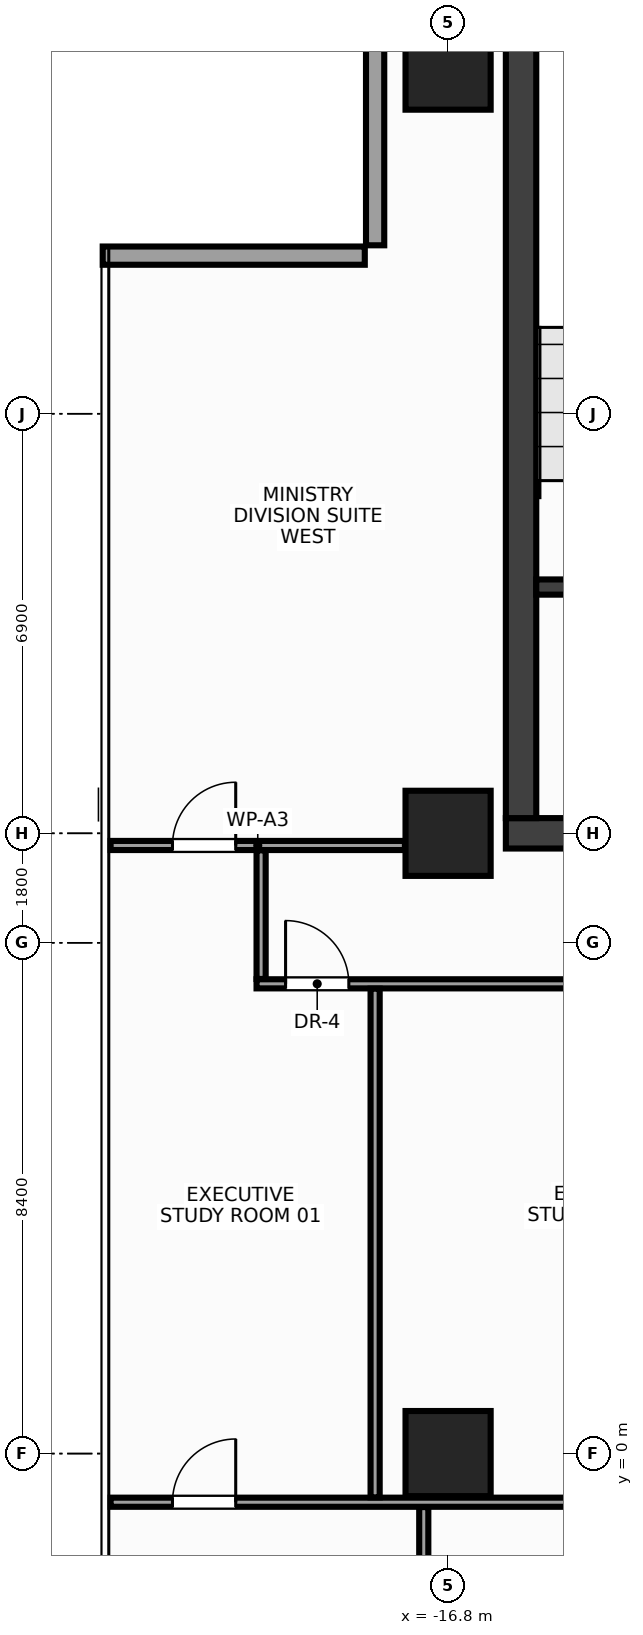
"""IFC4 building model, lengths in metres.
Left out: names, types, materials, properties, quantities, classifications, styles, units other than length and angle.
Written with IfcOpenShell. Run it as: python <this file> out.ifc"""

import sys

from ifc_helpers import new_model, si_unit, direction, frame, frame_2d, origin, origin_2d, place, context, subcontext, project, spatial, rectangle, extrude, source, transform, mapped, element, fill, save


model = new_model("IFC4")
c1 = context("Model", 3, precision=1e-05, world=origin(), true_north=direction((0.0, 1.0)))
c2 = subcontext(c1, "Body", "Model", "MODEL_VIEW")
j1 = project(units=[si_unit("LENGTHUNIT", "METRE"), si_unit("PLANEANGLEUNIT", "RADIAN")], contexts=[c1])
p1 = place(None, origin())
s1 = spatial("IfcSite", under=j1, at=p1, CompositionType="ELEMENT")
p2 = place(p1, origin())
s2 = spatial("IfcBuilding", under=s1, at=p2, CompositionType="ELEMENT")
p3 = place(p2, frame((0.0, 0.0, 243.2)))
s3 = spatial("IfcBuildingStorey", under=s2, at=p3, CompositionType="ELEMENT", Elevation=243.2)
m1 = source(origin(), c2, "Body", "SweptSolid", [
    extrude(rectangle(XDim=31.7, YDim=0.5, at=frame_2d((15.85, 0.0))), origin(), (0.0, 0.0, 1.0), 3.6),
])
p4 = place(p3, frame((-15.85, 10.2, 0.0), z_axis=(0.0, 0.0, 1.0), x_axis=(1.0, 0.0, 0.0)))
e1 = element("IfcWall", 1, at=p4, inside=s3, PredefinedType="SHEAR", context=c2, shape_type="MappedRepresentation", body=[
    mapped(m1, transform((0.0, 0.0, 0.0), x_axis=(1.0, 0.0, 0.0), y_axis=(0.0, 1.0, 0.0), z_axis=(0.0, 0.0, 1.0), scale=1.0)),
])
p5 = place(p4, frame((1.7, 0.0, 0.0)))
e2 = element("IfcOpeningElement", 2, at=p5, cuts=e1, PredefinedType="OPENING", context=c2, shape_type="SweptSolid", body=[
    extrude(rectangle(XDim=1.6, YDim=2.15, at=frame_2d((0.8, 1.075))), frame((0.0, 0.262, 0.0), z_axis=(0.0, -1.0, 0.0), x_axis=(1.0, 0.0, 0.0)), (0.0, 0.0, 1.0), 0.524),
])
p6 = place(p4, frame((28.4, 0.0, 0.0)))
e3 = element("IfcOpeningElement", 3, at=p6, cuts=e1, PredefinedType="OPENING", context=c2, shape_type="SweptSolid", body=[
    extrude(rectangle(XDim=1.6, YDim=2.15, at=frame_2d((0.8, 1.075))), frame((0.0, 0.262, 0.0), z_axis=(0.0, -1.0, 0.0), x_axis=(1.0, 0.0, 0.0)), (0.0, 0.0, 1.0), 0.524),
])
p7 = place(p4, frame((15.1, 0.0, 0.0)))
e4 = element("IfcOpeningElement", 4, at=p7, cuts=e1, PredefinedType="OPENING", context=c2, shape_type="SweptSolid", body=[
    extrude(rectangle(XDim=1.5, YDim=2.2, at=frame_2d((0.75, 1.1))), frame((0.0, 0.262, 0.0), z_axis=(0.0, -1.0, 0.0), x_axis=(1.0, 0.0, 0.0)), (0.0, 0.0, 1.0), 0.524),
])
m2 = source(origin(), c2, "Body", "SweptSolid", [
    extrude(rectangle(XDim=13.1, YDim=0.5, at=frame_2d((6.55, 0.0))), origin(), (0.0, 0.0, 1.0), 3.6),
])
p8 = place(p3, frame((-15.6, 10.45, 0.0), z_axis=(0.0, 0.0, 1.0), x_axis=(0.0, 1.0, 0.0)))
e5 = element("IfcWall", 5, at=p8, inside=s3, PredefinedType="SHEAR", context=c2, shape_type="MappedRepresentation", body=[
    mapped(m2, transform((0.0, 0.0, 0.0), x_axis=(1.0, 0.0, 0.0), y_axis=(0.0, 1.0, 0.0), z_axis=(0.0, 0.0, 1.0), scale=1.0)),
])
m3 = source(origin(), c2, "Body", "SweptSolid", [
    extrude(rectangle(XDim=3.705, YDim=0.25, at=frame_2d((1.853, 0.0))), origin(), (0.0, 0.0, 1.0), 3.6),
])
p9 = place(p3, frame((-15.35, 14.25, 0.0), z_axis=(0.0, 0.0, 1.0), x_axis=(1.0, 0.0, 0.0)))
e6 = element("IfcWall", 6, at=p9, inside=s3, PredefinedType="SHEAR", context=c2, shape_type="MappedRepresentation", body=[
    mapped(m3, transform((0.0, 0.0, 0.0), x_axis=(1.0, 0.0, 0.0), y_axis=(0.0, 1.0, 0.0), z_axis=(0.0, 0.0, 1.0), scale=1.0)),
])
p10 = place(p9, frame((0.95, 0.0, 0.0)))
e7 = element("IfcOpeningElement", 7, at=p10, cuts=e6, PredefinedType="OPENING", context=c2, shape_type="SweptSolid", body=[
    extrude(rectangle(XDim=1.6, YDim=2.15, at=frame_2d((0.8, 1.075))), frame((0.0, 0.137, 0.0), z_axis=(0.0, -1.0, 0.0), x_axis=(1.0, 0.0, 0.0)), (0.0, 0.0, 1.0), 0.274),
])
m4 = source(origin(), c2, "Body", "SweptSolid", [
    extrude(rectangle(XDim=1.4, YDim=1.4, at=origin_2d()), origin(), (0.0, 0.0, 1.0), 3.6),
])
for number, where, z_axis, x_axis in (
    (8, (-16.8, 0.0, 0.0), (0.0, 0.0, 1.0), (1.0, 0.0, 0.0)),
    (9, (-16.8, 10.2, 0.0), (0.0, 0.0, 1.0), (1.0, 0.0, 0.0)),
    (10, (-16.8, 22.8, 0.0), (0.0, 0.0, 1.0), (1.0, 0.0, 0.0)),
):
    element("IfcColumn", number, at=place(p3, frame(where, z_axis=z_axis, x_axis=x_axis)), inside=s3, PredefinedType="COLUMN", context=c2, shape_type="MappedRepresentation", body=[
        mapped(m4, transform((0.0, 0.0, 0.0), x_axis=(1.0, 0.0, 0.0), y_axis=(0.0, 1.0, 0.0), z_axis=(0.0, 0.0, 1.0), scale=1.0)),
    ])
m5 = source(origin(), c2, "Body", "SweptSolid", [
    extrude(rectangle(XDim=4.31, YDim=0.3, at=frame_2d((2.155, 0.0))), origin(), (0.0, 0.0, 1.0), 2.75),
])
p11 = place(p3, frame((-18.0, 24.18, 0.0), z_axis=(0.0, 0.0, 1.0), x_axis=(0.0, -1.0, 0.0)))
e11 = element("IfcWall", 11, at=p11, inside=s3, PredefinedType="STANDARD", context=c2, shape_type="MappedRepresentation", body=[
    mapped(m5, transform((0.0, 0.0, 0.0), x_axis=(1.0, 0.0, 0.0), y_axis=(0.0, 1.0, 0.0), z_axis=(0.0, 0.0, 1.0), scale=1.0)),
])
m6 = source(origin(), c2, "Body", "SweptSolid", [
    extrude(rectangle(XDim=4.31, YDim=0.3, at=frame_2d((2.155, 0.0))), origin(), (0.0, 0.0, 1.0), 2.75),
])
p12 = place(p3, frame((-18.17, 19.7, 0.0), z_axis=(0.0, 0.0, 1.0), x_axis=(-1.0, 0.0, 0.0)))
e12 = element("IfcWall", 12, at=p12, inside=s3, PredefinedType="STANDARD", context=c2, shape_type="MappedRepresentation", body=[
    mapped(m6, transform((0.0, 0.0, 0.0), x_axis=(1.0, 0.0, 0.0), y_axis=(0.0, 1.0, 0.0), z_axis=(0.0, 0.0, 1.0), scale=1.0)),
])
m7 = source(origin(), c2, "Body", "SweptSolid", [
    extrude(rectangle(XDim=4.84, YDim=0.15, at=frame_2d((2.42, 0.0))), origin(), (0.0, 0.0, 1.0), 3.37),
])
p13 = place(p3, frame((-22.35, 10.0, 0.0), z_axis=(0.0, 0.0, 1.0), x_axis=(1.0, 0.0, 0.0)))
e13 = element("IfcWall", 13, at=p13, inside=s3, PredefinedType="PARTITIONING", context=c2, shape_type="MappedRepresentation", body=[
    mapped(m7, transform((0.0, 0.0, 0.0), x_axis=(1.0, 0.0, 0.0), y_axis=(0.0, 1.0, 0.0), z_axis=(0.0, 0.0, 1.0), scale=1.0)),
])
p14 = place(p13, frame((1.018, 0.0, 0.0)))
e14 = element("IfcOpeningElement", 14, at=p14, cuts=e13, PredefinedType="OPENING", context=c2, shape_type="SweptSolid", body=[
    extrude(rectangle(XDim=1.04, YDim=2.2, at=frame_2d((0.52, 1.1))), frame((0.0, 0.087, 0.0), z_axis=(0.0, -1.0, 0.0), x_axis=(1.0, 0.0, 0.0)), (0.0, 0.0, 1.0), 0.174),
])
m8 = source(origin(), c2, "Body", "SweptSolid", [
    extrude(rectangle(XDim=15.6, YDim=0.15, at=frame_2d((7.8, 0.0))), origin(), (0.0, 0.0, 1.0), 2.755),
])
p15 = place(p3, frame((-19.95, 7.725, 0.0), z_axis=(0.0, 0.0, 1.0), x_axis=(1.0, 0.0, 0.0)))
e15 = element("IfcWall", 15, at=p15, inside=s3, PredefinedType="PARTITIONING", context=c2, shape_type="MappedRepresentation", body=[
    mapped(m8, transform((0.0, 0.0, 0.0), x_axis=(1.0, 0.0, 0.0), y_axis=(0.0, 1.0, 0.0), z_axis=(0.0, 0.0, 1.0), scale=1.0)),
])
p16 = place(p15, frame((0.478, 0.0, 0.0)))
e16 = element("IfcOpeningElement", 16, at=p16, cuts=e15, PredefinedType="OPENING", context=c2, shape_type="SweptSolid", body=[
    extrude(rectangle(XDim=1.04, YDim=2.2, at=frame_2d((0.52, 1.1))), frame((0.0, 0.087, 0.0), z_axis=(0.0, -1.0, 0.0), x_axis=(1.0, 0.0, 0.0)), (0.0, 0.0, 1.0), 0.174),
])
p17 = place(p15, frame((5.63, 0.0, 0.0)))
e17 = element("IfcOpeningElement", 17, at=p17, cuts=e15, PredefinedType="OPENING", context=c2, shape_type="SweptSolid", body=[
    extrude(rectangle(XDim=1.04, YDim=2.2, at=frame_2d((0.52, 1.1))), frame((0.0, 0.087, 0.0), z_axis=(0.0, -1.0, 0.0), x_axis=(1.0, 0.0, 0.0)), (0.0, 0.0, 1.0), 0.174),
])
p18 = place(p15, frame((12.433, 0.0, 0.0)))
e18 = element("IfcOpeningElement", 18, at=p18, cuts=e15, PredefinedType="OPENING", context=c2, shape_type="SweptSolid", body=[
    extrude(rectangle(XDim=1.04, YDim=2.2, at=frame_2d((0.52, 1.1))), frame((0.0, 0.087, 0.0), z_axis=(0.0, -1.0, 0.0), x_axis=(1.0, 0.0, 0.0)), (0.0, 0.0, 1.0), 0.174),
])
m9 = source(origin(), c2, "Body", "SweptSolid", [
    extrude(rectangle(XDim=2.115, YDim=0.15, at=frame_2d((1.058, 0.0))), origin(), (0.0, 0.0, 1.0), 3.37),
])
p19 = place(p3, frame((-19.875, 7.805, 0.0), z_axis=(0.0, 0.0, 1.0), x_axis=(0.0, 1.0, 0.0)))
e19 = element("IfcWall", 19, at=p19, inside=s3, PredefinedType="PARTITIONING", context=c2, shape_type="MappedRepresentation", body=[
    mapped(m9, transform((0.0, 0.0, 0.0), x_axis=(1.0, 0.0, 0.0), y_axis=(0.0, 1.0, 0.0), z_axis=(0.0, 0.0, 1.0), scale=1.0)),
])
m10 = source(origin(), c2, "Body", "SweptSolid", [
    extrude(rectangle(XDim=17.995, YDim=0.15, at=frame_2d((8.998, 0.0))), origin(), (0.0, 0.0, 1.0), 2.755),
])
p20 = place(p3, frame((-22.35, -0.8, 0.0), z_axis=(0.0, 0.0, 1.0), x_axis=(1.0, 0.0, 0.0)))
e20 = element("IfcWall", 20, at=p20, inside=s3, PredefinedType="PARTITIONING", context=c2, shape_type="MappedRepresentation", body=[
    mapped(m10, transform((0.0, 0.0, 0.0), x_axis=(1.0, 0.0, 0.0), y_axis=(0.0, 1.0, 0.0), z_axis=(0.0, 0.0, 1.0), scale=1.0)),
])
p21 = place(p20, frame((1.018, 0.0, 0.0)))
e21 = element("IfcOpeningElement", 21, at=p21, cuts=e20, PredefinedType="OPENING", context=c2, shape_type="SweptSolid", body=[
    extrude(rectangle(XDim=1.04, YDim=2.2, at=frame_2d((0.52, 1.1))), frame((0.0, 0.087, 0.0), z_axis=(0.0, -1.0, 0.0), x_axis=(1.0, 0.0, 0.0)), (0.0, 0.0, 1.0), 0.174),
])
p22 = place(p20, frame((8.03, 0.0, 0.0)))
e22 = element("IfcOpeningElement", 22, at=p22, cuts=e20, PredefinedType="OPENING", context=c2, shape_type="SweptSolid", body=[
    extrude(rectangle(XDim=1.04, YDim=2.2, at=frame_2d((0.52, 1.1))), frame((0.0, 0.087, 0.0), z_axis=(0.0, -1.0, 0.0), x_axis=(1.0, 0.0, 0.0)), (0.0, 0.0, 1.0), 0.174),
])
m11 = source(origin(), c2, "Body", "SweptSolid", [
    extrude(rectangle(XDim=8.365, YDim=0.15, at=frame_2d((4.183, 0.0))), origin(), (0.0, 0.0, 1.0), 3.37),
])
p23 = place(p3, frame((-18.0, -0.72, 0.0), z_axis=(0.0, 0.0, 1.0), x_axis=(0.0, 1.0, 0.0)))
e23 = element("IfcWall", 23, at=p23, inside=s3, PredefinedType="PARTITIONING", context=c2, shape_type="MappedRepresentation", body=[
    mapped(m11, transform((0.0, 0.0, 0.0), x_axis=(1.0, 0.0, 0.0), y_axis=(0.0, 1.0, 0.0), z_axis=(0.0, 0.0, 1.0), scale=1.0)),
])
m12 = source(origin(), c2, "Body", "SweptSolid", [
    extrude(rectangle(XDim=9.21, YDim=0.15, at=frame_2d((4.605, 0.0))), origin(), (0.0, 0.0, 1.0), 3.37),
])
p24 = place(p3, frame((-17.2, -10.09, 0.0), z_axis=(0.0, 0.0, 1.0), x_axis=(0.0, 1.0, 0.0)))
e24 = element("IfcWall", 24, at=p24, inside=s3, PredefinedType="PARTITIONING", context=c2, shape_type="MappedRepresentation", body=[
    mapped(m12, transform((0.0, 0.0, 0.0), x_axis=(1.0, 0.0, 0.0), y_axis=(0.0, 1.0, 0.0), z_axis=(0.0, 0.0, 1.0), scale=1.0)),
])
m13 = source(origin(), c2, "Body", "SweptSolid", [
    extrude(rectangle(XDim=1.04, YDim=2.2, at=frame_2d((0.52, 1.1))), frame((0.0, 0.025, 0.0), z_axis=(0.0, -1.0, 0.0), x_axis=(1.0, 0.0, 0.0)), (0.0, 0.0, 1.0), 0.05),
])
p25 = place(p16, origin())
e25 = element("IfcDoor", 25, at=p25, inside=s3, OperationType="SINGLE_SWING_LEFT", PredefinedType="DOOR", context=c2, shape_type="MappedRepresentation", body=[
    mapped(m13, transform((0.0, 0.0, 0.0), x_axis=(1.0, 0.0, 0.0), y_axis=(0.0, 1.0, 0.0), z_axis=(0.0, 0.0, 1.0), scale=1.0)),
])
fill(e16, e25)
p26 = place(p14, origin())
e26 = element("IfcDoor", 26, at=p26, inside=s3, OperationType="SINGLE_SWING_RIGHT", PredefinedType="DOOR", context=c2, shape_type="MappedRepresentation", body=[
    mapped(m13, transform((0.0, 0.0, 0.0), x_axis=(1.0, 0.0, 0.0), y_axis=(0.0, 1.0, 0.0), z_axis=(0.0, 0.0, 1.0), scale=1.0)),
])
fill(e14, e26)
p27 = place(p21, origin())
e27 = element("IfcDoor", 27, at=p27, inside=s3, OperationType="SINGLE_SWING_RIGHT", PredefinedType="DOOR", context=c2, shape_type="MappedRepresentation", body=[
    mapped(m13, transform((0.0, 0.0, 0.0), x_axis=(1.0, 0.0, 0.0), y_axis=(0.0, 1.0, 0.0), z_axis=(0.0, 0.0, 1.0), scale=1.0)),
])
fill(e21, e27)
save(model, sys.argv[1])
